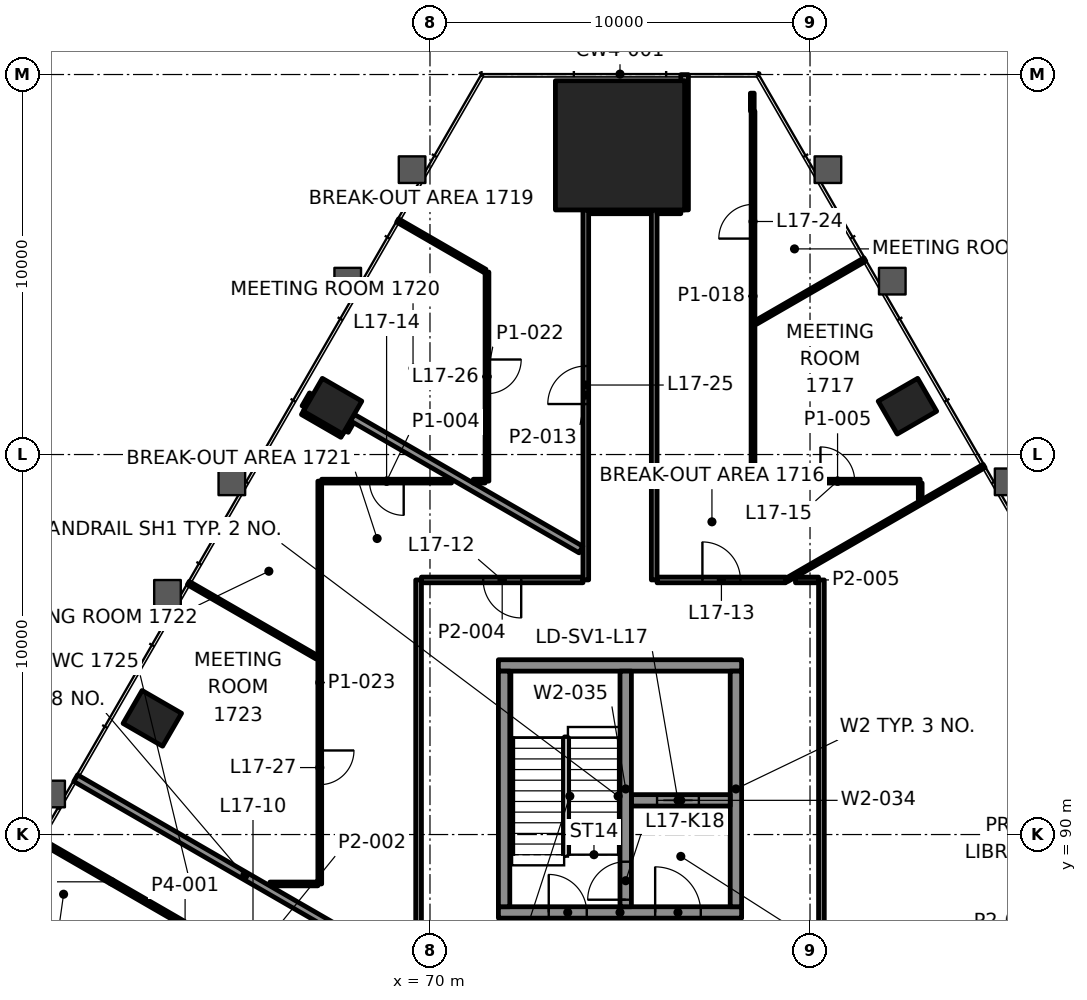
"""IFC4 building model, lengths in metres.
Left out: names, types, materials, properties, quantities, classifications, styles, units other than length and angle.
Written with IfcOpenShell. Run it as: python <this file> out.ifc"""

import sys

from ifc_helpers import new_model, si_unit, direction, frame, frame_2d, origin, origin_2d, place, context, subcontext, project, spatial, rectangle, extrude, element, fill, save


model = new_model("IFC4")
c1 = context("Model", 3, precision=1e-05, world=origin(), true_north=direction((0.0, 1.0)))
c2 = subcontext(c1, "Body", "Model", "MODEL_VIEW")
j1 = project(units=[si_unit("LENGTHUNIT", "METRE"), si_unit("PLANEANGLEUNIT", "RADIAN")], contexts=[c1])
p1 = place(None, origin())
s1 = spatial("IfcSite", under=j1, at=p1, CompositionType="ELEMENT")
p2 = place(p1, origin())
s2 = spatial("IfcBuilding", under=s1, at=p2, CompositionType="ELEMENT")
p3 = place(p2, frame((0.0, 0.0, 77.8)))
s3 = spatial("IfcBuildingStorey", under=s2, at=p3, CompositionType="ELEMENT", Elevation=77.8)
p4 = place(p3, frame((75.0, 108.136, 0.0), z_axis=(0.0, 0.0, 1.0), x_axis=(-1.0, 0.0, 0.0)))
e1 = element("IfcColumn", 1, at=p4, inside=s3, PredefinedType="COLUMN", context=c2, shape_type="SweptSolid", body=[
    extrude(rectangle(XDim=3.4, YDim=3.4, at=origin_2d()), origin(), (0.0, 0.0, 1.0), 4.2),
])
for number, where, z_axis, x_axis in (
    (2, (82.563, 101.272, -0.0), (0.0, 0.0, 1.0), (-0.5, 0.866, 0.0)),
    (3, (67.437, 101.272, -0.0), (0.0, 0.0, 1.0), (-0.5, -0.866, 0.0)),
    (4, (62.694, 93.057, -0.0), (0.0, 0.0, 1.0), (-0.5, -0.866, 0.0)),
):
    element("IfcColumn", number, at=place(p3, frame(where, z_axis=z_axis, x_axis=x_axis)), inside=s3, PredefinedType="COLUMN", context=c2, shape_type="SweptSolid", body=[
        extrude(rectangle(XDim=1.0, YDim=1.2, at=origin_2d()), origin(), (0.0, 0.0, 1.0), 4.2),
    ])
p5 = place(p3, frame((71.8, 87.95, 0.0), z_axis=(0.0, 0.0, 1.0), x_axis=(1.0, 0.0, 0.0)))
e5 = element("IfcWall", 5, at=p5, inside=s3, PredefinedType="SHEAR", context=c2, shape_type="SweptSolid", body=[
    extrude(rectangle(XDim=6.4, YDim=0.3, at=frame_2d((3.2, 0.0))), origin(), (0.0, 0.0, 1.0), 4.0),
])
p6 = place(p5, frame((1.325, 0.0, 0.0)))
e6 = element("IfcOpeningElement", 6, at=p6, cuts=e5, PredefinedType="OPENING", context=c2, shape_type="SweptSolid", body=[
    extrude(rectangle(XDim=1.0, YDim=2.1, at=frame_2d((0.5, 1.05))), frame((0.0, 0.16, 0.0), z_axis=(0.0, -1.0, 0.0), x_axis=(1.0, 0.0, 0.0)), (0.0, 0.0, 1.0), 0.32),
])
p7 = place(p5, frame((4.125, 0.0, 0.0)))
e7 = element("IfcOpeningElement", 7, at=p7, cuts=e5, PredefinedType="OPENING", context=c2, shape_type="SweptSolid", body=[
    extrude(rectangle(XDim=1.2, YDim=2.1, at=frame_2d((0.6, 1.05))), frame((0.0, 0.16, 0.0), z_axis=(0.0, -1.0, 0.0), x_axis=(1.0, 0.0, 0.0)), (0.0, 0.0, 1.0), 0.32),
])
p8 = place(p3, frame((71.8, 94.45, 0.0), z_axis=(0.0, 0.0, 1.0), x_axis=(1.0, 0.0, 0.0)))
e8 = element("IfcWall", 8, at=p8, inside=s3, PredefinedType="SHEAR", context=c2, shape_type="SweptSolid", body=[
    extrude(rectangle(XDim=6.4, YDim=0.3, at=frame_2d((3.2, 0.0))), origin(), (0.0, 0.0, 1.0), 4.0),
])
for number, where, z_axis, x_axis in (
    (9, (71.95, 88.1, 0.0), (0.0, 0.0, 1.0), (0.0, 1.0, 0.0)),
    (10, (78.05, 88.1, 0.0), (0.0, 0.0, 1.0), (0.0, 1.0, 0.0)),
):
    element("IfcWall", number, at=place(p3, frame(where, z_axis=z_axis, x_axis=x_axis)), inside=s3, PredefinedType="SHEAR", context=c2, shape_type="SweptSolid", body=[
        extrude(rectangle(XDim=6.2, YDim=0.3, at=frame_2d((3.1, 0.0))), origin(), (0.0, 0.0, 1.0), 4.0),
    ])
p9 = place(p3, frame((75.3, 90.9, 0.0), z_axis=(0.0, 0.0, 1.0), x_axis=(1.0, 0.0, 0.0)))
e11 = element("IfcWall", 11, at=p9, inside=s3, PredefinedType="SHEAR", context=c2, shape_type="SweptSolid", body=[
    extrude(rectangle(XDim=2.6, YDim=0.3, at=frame_2d((1.3, 0.0))), origin(), (0.0, 0.0, 1.0), 4.0),
])
p10 = place(p9, frame((0.675, 0.0, 0.0)))
e12 = element("IfcOpeningElement", 12, at=p10, cuts=e11, PredefinedType="OPENING", context=c2, shape_type="SweptSolid", body=[
    extrude(rectangle(XDim=1.1, YDim=2.1, at=frame_2d((0.55, 1.05))), frame((0.0, 0.16, 0.0), z_axis=(0.0, -1.0, 0.0), x_axis=(1.0, 0.0, 0.0)), (0.0, 0.0, 1.0), 0.32),
])
p11 = place(p3, frame((75.15, 88.1, 0.0), z_axis=(0.0, 0.0, 1.0), x_axis=(0.0, 1.0, 0.0)))
e13 = element("IfcWall", 13, at=p11, inside=s3, PredefinedType="SHEAR", context=c2, shape_type="SweptSolid", body=[
    extrude(rectangle(XDim=6.2, YDim=0.3, at=frame_2d((3.1, 0.0))), origin(), (0.0, 0.0, 1.0), 4.0),
])
p12 = place(p11, frame((0.185, 0.0, 0.0)))
e14 = element("IfcOpeningElement", 14, at=p12, cuts=e13, PredefinedType="OPENING", context=c2, shape_type="SweptSolid", body=[
    extrude(rectangle(XDim=1.0, YDim=2.1, at=frame_2d((0.5, 1.05))), frame((0.0, 0.16, 0.0), z_axis=(0.0, -1.0, 0.0), x_axis=(1.0, 0.0, 0.0)), (0.0, 0.0, 1.0), 0.32),
])
p13 = place(p3, frame((65.789, 88.7, 0.0), z_axis=(0.0, 0.0, 1.0), x_axis=(1.0, 0.0, 0.0)))
e15 = element("IfcWall", 15, at=p13, inside=s3, PredefinedType="PARTITIONING", context=c2, shape_type="SweptSolid", body=[
    extrude(rectangle(XDim=1.261, YDim=0.1, at=frame_2d((0.631, 0.0))), origin(), (0.0, 0.0, 1.0), 3.4),
])
p14 = place(p3, frame((74.025, 96.7, 0.0), z_axis=(0.0, 0.0, 1.0), x_axis=(-1.0, 0.0, 0.0)))
e16 = element("IfcWall", 16, at=p14, inside=s3, PredefinedType="PARTITIONING", context=c2, shape_type="SweptSolid", body=[
    extrude(rectangle(XDim=4.25, YDim=0.15, at=frame_2d((2.125, 0.0))), origin(), (0.0, 0.0, 1.0), 3.4),
])
p15 = place(p14, frame((1.625, 0.0, 0.0)))
e17 = element("IfcOpeningElement", 17, at=p15, cuts=e16, PredefinedType="OPENING", context=c2, shape_type="SweptSolid", body=[
    extrude(rectangle(XDim=1.0, YDim=2.1, at=frame_2d((0.5, 1.05))), frame((0.0, 0.085, 0.0), z_axis=(0.0, -1.0, 0.0), x_axis=(1.0, 0.0, 0.0)), (0.0, 0.0, 1.0), 0.17),
])
p16 = place(p3, frame((75.975, 96.7, 0.0), z_axis=(0.0, 0.0, 1.0), x_axis=(1.0, 0.0, 0.0)))
e18 = element("IfcWall", 18, at=p16, inside=s3, PredefinedType="PARTITIONING", context=c2, shape_type="SweptSolid", body=[
    extrude(rectangle(XDim=3.387, YDim=0.15, at=frame_2d((1.693, 0.0))), origin(), (0.0, 0.0, 1.0), 3.4),
])
p17 = place(p16, frame((1.194, 0.0, 0.0)))
e19 = element("IfcOpeningElement", 19, at=p17, cuts=e18, PredefinedType="OPENING", context=c2, shape_type="SweptSolid", body=[
    extrude(rectangle(XDim=1.0, YDim=2.1, at=frame_2d((0.5, 1.05))), frame((0.0, 0.085, 0.0), z_axis=(0.0, -1.0, 0.0), x_axis=(1.0, 0.0, 0.0)), (0.0, 0.0, 1.0), 0.17),
])
p18 = place(p3, frame((70.567, 99.3, 0.0), z_axis=(0.0, 0.0, 1.0), x_axis=(-1.0, 0.0, 0.0)))
e20 = element("IfcWall", 20, at=p18, inside=s3, PredefinedType="PARTITIONING", context=c2, shape_type="SweptSolid", body=[
    extrude(rectangle(XDim=3.417, YDim=0.1, at=frame_2d((1.708, 0.0))), origin(), (0.0, 0.0, 1.0), 3.4),
])
p19 = place(p18, frame((1.258, 0.0, 0.0)))
e21 = element("IfcOpeningElement", 21, at=p19, cuts=e20, PredefinedType="OPENING", context=c2, shape_type="SweptSolid", body=[
    extrude(rectangle(XDim=0.9, YDim=2.1, at=frame_2d((0.45, 1.05))), frame((0.0, 0.06, 0.0), z_axis=(0.0, -1.0, 0.0), x_axis=(1.0, 0.0, 0.0)), (0.0, 0.0, 1.0), 0.12),
])
p20 = place(p3, frame((78.55, 99.3, 0.0), z_axis=(0.0, 0.0, 1.0), x_axis=(1.0, 0.0, 0.0)))
e22 = element("IfcWall", 22, at=p20, inside=s3, PredefinedType="PARTITIONING", context=c2, shape_type="SweptSolid", body=[
    extrude(rectangle(XDim=4.349, YDim=0.1, at=frame_2d((2.175, 0.0))), origin(), (0.0, 0.0, 1.0), 3.4),
])
p21 = place(p20, frame((1.725, 0.0, 0.0)))
e23 = element("IfcOpeningElement", 23, at=p21, cuts=e22, PredefinedType="OPENING", context=c2, shape_type="SweptSolid", body=[
    extrude(rectangle(XDim=0.9, YDim=2.1, at=frame_2d((0.45, 1.05))), frame((0.0, 0.06, 0.0), z_axis=(0.0, -1.0, 0.0), x_axis=(1.0, 0.0, 0.0)), (0.0, 0.0, 1.0), 0.12),
])
p22 = place(p3, frame((74.176, 106.437, 0.0), z_axis=(0.0, 0.0, 1.0), x_axis=(1.0, 0.0, 0.0)))
e24 = element("IfcWall", 24, at=p22, inside=s3, PredefinedType="PARTITIONING", context=c2, shape_type="SweptSolid", body=[
    extrude(rectangle(XDim=1.649, YDim=0.2, at=frame_2d((0.825, 0.0))), origin(), (0.0, 0.0, 1.0), 3.397),
])
p23 = place(p3, frame((79.387, 96.7, 0.0), z_axis=(0.0, 0.0, 1.0), x_axis=(0.866032365835, 0.499987941182, 0.0)))
e25 = element("IfcWall", 25, at=p23, inside=s3, PredefinedType="PARTITIONING", context=c2, shape_type="SweptSolid", body=[
    extrude(rectangle(XDim=5.997, YDim=0.1, at=frame_2d((2.999, 0.0))), origin(), (0.0, 0.0, 1.0), 3.165),
])
p24 = place(p3, frame((78.576, 103.476, 0.0), z_axis=(0.0, 0.0, 1.0), x_axis=(0.866043162687, 0.499969239416, 0.0)))
e26 = element("IfcWall", 26, at=p24, inside=s3, PredefinedType="PARTITIONING", context=c2, shape_type="SweptSolid", body=[
    extrude(rectangle(XDim=3.311, YDim=0.1, at=frame_2d((1.656, 0.0))), origin(), (0.0, 0.0, 1.0), 3.4),
])
p25 = place(p3, frame((67.761, 100.634, 0.0), z_axis=(0.0, 0.0, 1.0), x_axis=(0.500305662732, 0.865848857387, 0.0)))
e27 = element("IfcWall", 27, at=p25, inside=s3, PredefinedType="PARTITIONING", context=c2, shape_type="SweptSolid", body=[
    extrude(rectangle(XDim=0.29, YDim=0.2, at=frame_2d((0.145, 0.0))), origin(), (0.0, 0.0, 1.0), 3.4),
])
p26 = place(p3, frame((66.721, 101.232, 0.0), z_axis=(0.0, 0.0, 1.0), x_axis=(0.500080938595, 0.865978668822, 0.0)))
e28 = element("IfcWall", 28, at=p26, inside=s3, PredefinedType="PARTITIONING", context=c2, shape_type="SweptSolid", body=[
    extrude(rectangle(XDim=0.393, YDim=0.2, at=frame_2d((0.197, 0.0))), origin(), (0.0, 0.0, 1.0), 3.4),
])
p27 = place(p3, frame((82.9, 98.816, 0.0), z_axis=(0.0, 0.0, 1.0), x_axis=(0.0, 1.0, 0.0)))
e29 = element("IfcWall", 29, at=p27, inside=s3, PredefinedType="PARTITIONING", context=c2, shape_type="SweptSolid", body=[
    extrude(rectangle(XDim=0.433, YDim=0.1, at=frame_2d((0.217, 0.0))), origin(), (0.0, 0.0, 1.0), 3.4),
])
p28 = place(p3, frame((80.3, 86.1, 0.0), z_axis=(0.0, 0.0, 1.0), x_axis=(0.0, 1.0, 0.0)))
e30 = element("IfcWall", 30, at=p28, inside=s3, PredefinedType="PARTITIONING", context=c2, shape_type="SweptSolid", body=[
    extrude(rectangle(XDim=10.599, YDim=0.15, at=frame_2d((5.3, 0.0))), origin(), (0.0, 0.0, 1.0), 3.4),
])
p29 = place(p3, frame((78.5, 99.3, 0.0), z_axis=(0.0, 0.0, 1.0), x_axis=(0.0, 1.0, 0.0)))
e31 = element("IfcWall", 31, at=p29, inside=s3, PredefinedType="PARTITIONING", context=c2, shape_type="SweptSolid", body=[
    extrude(rectangle(XDim=9.736, YDim=0.1, at=frame_2d((4.868, 0.0))), origin(), (0.0, 0.0, 1.0), 3.4),
])
p30 = place(p29, frame((6.382, 0.0, 0.0)))
e32 = element("IfcOpeningElement", 32, at=p30, cuts=e31, PredefinedType="OPENING", context=c2, shape_type="SweptSolid", body=[
    extrude(rectangle(XDim=0.9, YDim=2.1, at=frame_2d((0.45, 1.05))), frame((0.0, 0.06, 0.0), z_axis=(0.0, -1.0, 0.0), x_axis=(1.0, 0.0, 0.0)), (0.0, 0.0, 1.0), 0.12),
])
p31 = place(p3, frame((78.481, 109.037, 0.0), z_axis=(0.0, 0.0, 1.0), x_axis=(0.0, 1.0, 0.0)))
e33 = element("IfcWall", 33, at=p31, inside=s3, PredefinedType="PARTITIONING", context=c2, shape_type="SweptSolid", body=[
    extrude(rectangle(XDim=0.473, YDim=0.1, at=frame_2d((0.237, 0.0))), origin(), (0.0, 0.0, 1.0), 3.4),
])
p32 = place(p3, frame((76.7, 106.437, 0.0), z_axis=(0.0, 0.0, 1.0), x_axis=(0.0, 1.0, 0.0)))
e34 = element("IfcWall", 34, at=p32, inside=s3, PredefinedType="PARTITIONING", context=c2, shape_type="SweptSolid", body=[
    extrude(rectangle(XDim=3.56, YDim=0.2, at=frame_2d((1.78, 0.0))), origin(), (0.0, 0.0, 1.0), 3.4),
])
p33 = place(p3, frame((75.9, 96.7, 0.0), z_axis=(0.0, 0.0, 1.0), x_axis=(0.0, 1.0, 0.0)))
e35 = element("IfcWall", 35, at=p33, inside=s3, PredefinedType="PARTITIONING", context=c2, shape_type="SweptSolid", body=[
    extrude(rectangle(XDim=9.737, YDim=0.15, at=frame_2d((4.868, 0.0))), origin(), (0.0, 0.0, 1.0), 3.4),
])
p34 = place(p3, frame((74.1, 96.7, 0.0), z_axis=(0.0, 0.0, 1.0), x_axis=(0.0, 1.0, 0.0)))
e36 = element("IfcWall", 36, at=p34, inside=s3, PredefinedType="PARTITIONING", context=c2, shape_type="SweptSolid", body=[
    extrude(rectangle(XDim=9.736, YDim=0.15, at=frame_2d((4.868, 0.0))), origin(), (0.0, 0.0, 1.0), 3.4),
])
p35 = place(p34, frame((4.629, 0.0, 0.0)))
e37 = element("IfcOpeningElement", 37, at=p35, cuts=e36, PredefinedType="OPENING", context=c2, shape_type="SweptSolid", body=[
    extrude(rectangle(XDim=1.0, YDim=2.1, at=frame_2d((0.5, 1.05))), frame((0.0, 0.085, 0.0), z_axis=(0.0, -1.0, 0.0), x_axis=(1.0, 0.0, 0.0)), (0.0, 0.0, 1.0), 0.17),
])
p36 = place(p3, frame((71.5, 104.801, 0.0), z_axis=(0.0, 0.0, 1.0), x_axis=(0.0, -1.0, 0.0)))
e38 = element("IfcWall", 38, at=p36, inside=s3, PredefinedType="PARTITIONING", context=c2, shape_type="SweptSolid", body=[
    extrude(rectangle(XDim=5.501, YDim=0.1, at=frame_2d((2.75, 0.0))), origin(), (0.0, 0.0, 1.0), 3.4),
])
p37 = place(p36, frame((2.301, 0.0, 0.0)))
e39 = element("IfcOpeningElement", 39, at=p37, cuts=e38, PredefinedType="OPENING", context=c2, shape_type="SweptSolid", body=[
    extrude(rectangle(XDim=0.9, YDim=2.1, at=frame_2d((0.45, 1.05))), frame((0.0, 0.06, 0.0), z_axis=(0.0, -1.0, 0.0), x_axis=(1.0, 0.0, 0.0)), (0.0, 0.0, 1.0), 0.12),
])
p38 = place(p3, frame((69.7, 86.1, 0.0), z_axis=(0.0, 0.0, 1.0), x_axis=(0.0, 1.0, 0.0)))
e40 = element("IfcWall", 40, at=p38, inside=s3, PredefinedType="PARTITIONING", context=c2, shape_type="SweptSolid", body=[
    extrude(rectangle(XDim=10.6, YDim=0.15, at=frame_2d((5.3, 0.0))), origin(), (0.0, 0.0, 1.0), 3.4),
])
p39 = place(p3, frame((67.1, 99.3, 0.0), z_axis=(0.0, 0.0, 1.0), x_axis=(0.0, -1.0, 0.0)))
e41 = element("IfcWall", 41, at=p39, inside=s3, PredefinedType="PARTITIONING", context=c2, shape_type="SweptSolid", body=[
    extrude(rectangle(XDim=10.6, YDim=0.1, at=frame_2d((5.3, 0.0))), origin(), (0.0, 0.0, 1.0), 3.4),
])
p40 = place(p39, frame((7.088, 0.0, 0.0)))
e42 = element("IfcOpeningElement", 42, at=p40, cuts=e41, PredefinedType="OPENING", context=c2, shape_type="SweptSolid", body=[
    extrude(rectangle(XDim=0.9, YDim=2.1, at=frame_2d((0.45, 1.05))), frame((0.0, 0.06, 0.0), z_axis=(0.0, -1.0, 0.0), x_axis=(1.0, 0.0, 0.0)), (0.0, 0.0, 1.0), 0.12),
])
p41 = place(p3, frame((71.45, 104.83, 0.0), z_axis=(0.0, 0.0, 1.0), x_axis=(-0.866023371876, 0.500003519352, 0.0)))
e43 = element("IfcWall", 43, at=p41, inside=s3, PredefinedType="PARTITIONING", context=c2, shape_type="SweptSolid", body=[
    extrude(rectangle(XDim=2.657, YDim=0.1, at=frame_2d((1.328, 0.0))), origin(), (0.0, 0.0, 1.0), 3.4),
])
p42 = place(p3, frame((73.973, 97.499, 0.0), z_axis=(0.0, 0.0, 1.0), x_axis=(-0.866037536751, 0.499978984496, 0.0)))
e44 = element("IfcWall", 44, at=p42, inside=s3, PredefinedType="PARTITIONING", context=c2, shape_type="SweptSolid", body=[
    extrude(rectangle(XDim=6.948, YDim=0.2, at=frame_2d((3.474, 0.0))), origin(), (0.0, 0.0, 1.0), 3.4),
])
p43 = place(p3, frame((67.707, 100.539, 0.0), z_axis=(0.0, 0.0, 1.0), x_axis=(-0.865955154139, 0.50012165622, 0.0)))
e45 = element("IfcWall", 45, at=p43, inside=s3, PredefinedType="PARTITIONING", context=c2, shape_type="SweptSolid", body=[
    extrude(rectangle(XDim=1.2, YDim=0.2, at=frame_2d((0.6, 0.0))), origin(), (0.0, 0.0, 1.0), 3.165),
])
p44 = place(p3, frame((67.024, 94.665, 0.0), z_axis=(0.0, 0.0, 1.0), x_axis=(-0.866046116492, 0.499964122822, 0.0)))
e46 = element("IfcWall", 46, at=p44, inside=s3, PredefinedType="PARTITIONING", context=c2, shape_type="SweptSolid", body=[
    extrude(rectangle(XDim=3.906, YDim=0.1, at=frame_2d((1.953, 0.0))), origin(), (0.0, 0.0, 1.0), 3.165),
])
p45 = place(p3, frame((69.573, 86.348, 0.0), z_axis=(0.0, 0.0, 1.0), x_axis=(-0.866024495625, 0.500001572974, 0.0)))
e47 = element("IfcWall", 47, at=p45, inside=s3, PredefinedType="PARTITIONING", context=c2, shape_type="SweptSolid", body=[
    extrude(rectangle(XDim=10.272, YDim=0.2, at=frame_2d((5.136, 0.0))), origin(), (0.0, 0.0, 1.0), 3.165),
])
p46 = place(p3, frame((63.512, 87.665, 0.0), z_axis=(0.0, 0.0, 1.0), x_axis=(-0.866014185868, 0.500019429497, 0.0)))
e48 = element("IfcWall", 48, at=p46, inside=s3, PredefinedType="PARTITIONING", context=c2, shape_type="SweptSolid", body=[
    extrude(rectangle(XDim=4.365, YDim=0.12, at=frame_2d((2.182, 0.0))), origin(), (0.0, 0.0, 1.0), 3.165),
])
p47 = place(p3, frame((79.617, 96.7, 0.0), z_axis=(0.0, 0.0, 1.0), x_axis=(1.0, 0.0, 0.0)))
e49 = element("IfcWall", 49, at=p47, inside=s3, PredefinedType="PARTITIONING", context=c2, shape_type="SweptSolid", body=[
    extrude(rectangle(XDim=0.607, YDim=0.15, at=frame_2d((0.304, 0.0))), origin(), (0.0, 0.0, 1.0), 3.4),
])
p48 = place(p3, frame((71.14, 99.3, 0.0), z_axis=(0.0, 0.0, 1.0), x_axis=(1.0, 0.0, 0.0)))
e50 = element("IfcWall", 50, at=p48, inside=s3, PredefinedType="PARTITIONING", context=c2, shape_type="SweptSolid", body=[
    extrude(rectangle(XDim=0.31, YDim=0.1, at=frame_2d((0.155, 0.0))), origin(), (0.0, 0.0, 1.0), 3.4),
])
p49 = place(p3, frame((75.975, 106.437, 0.0), z_axis=(0.0, 0.0, 1.0), x_axis=(1.0, 0.0, 0.0)))
e51 = element("IfcWall", 51, at=p49, inside=s3, PredefinedType="PARTITIONING", context=c2, shape_type="SweptSolid", body=[
    extrude(rectangle(XDim=0.625, YDim=0.2, at=frame_2d((0.312, 0.0))), origin(), (0.0, 0.0, 1.0), 3.4),
])
p50 = place(p15, origin())
e52 = element("IfcDoor", 52, at=p50, inside=s3, OperationType="SINGLE_SWING_LEFT", PredefinedType="DOOR", context=c2, shape_type="SweptSolid", body=[
    extrude(rectangle(XDim=1.0, YDim=2.1, at=frame_2d((0.5, 1.05))), frame((0.0, 0.025, 0.0), z_axis=(0.0, -1.0, 0.0), x_axis=(1.0, 0.0, 0.0)), (0.0, 0.0, 1.0), 0.05),
])
fill(e17, e52)
p51 = place(p17, origin())
e53 = element("IfcDoor", 53, at=p51, inside=s3, OperationType="SINGLE_SWING_LEFT", PredefinedType="DOOR", context=c2, shape_type="SweptSolid", body=[
    extrude(rectangle(XDim=1.0, YDim=2.1, at=frame_2d((0.5, 1.05))), frame((0.0, 0.025, 0.0), z_axis=(0.0, -1.0, 0.0), x_axis=(1.0, 0.0, 0.0)), (0.0, 0.0, 1.0), 0.05),
])
fill(e19, e53)
p52 = place(p19, origin())
e54 = element("IfcDoor", 54, at=p52, inside=s3, OperationType="SINGLE_SWING_RIGHT", PredefinedType="DOOR", context=c2, shape_type="SweptSolid", body=[
    extrude(rectangle(XDim=0.9, YDim=2.1, at=frame_2d((0.45, 1.05))), frame((0.0, 0.025, 0.0), z_axis=(0.0, -1.0, 0.0), x_axis=(1.0, 0.0, 0.0)), (0.0, 0.0, 1.0), 0.05),
])
fill(e21, e54)
p53 = place(p21, origin())
e55 = element("IfcDoor", 55, at=p53, inside=s3, OperationType="SINGLE_SWING_RIGHT", PredefinedType="DOOR", context=c2, shape_type="SweptSolid", body=[
    extrude(rectangle(XDim=0.9, YDim=2.1, at=frame_2d((0.45, 1.05))), frame((0.0, 0.025, 0.0), z_axis=(0.0, -1.0, 0.0), x_axis=(1.0, 0.0, 0.0)), (0.0, 0.0, 1.0), 0.05),
])
fill(e23, e55)
p54 = place(p30, origin())
e56 = element("IfcDoor", 56, at=p54, inside=s3, OperationType="SINGLE_SWING_LEFT", PredefinedType="DOOR", context=c2, shape_type="SweptSolid", body=[
    extrude(rectangle(XDim=0.9, YDim=2.1, at=frame_2d((0.45, 1.05))), frame((0.0, 0.025, 0.0), z_axis=(0.0, -1.0, 0.0), x_axis=(1.0, 0.0, 0.0)), (0.0, 0.0, 1.0), 0.05),
])
fill(e32, e56)
p55 = place(p35, origin())
e57 = element("IfcDoor", 57, at=p55, inside=s3, OperationType="SINGLE_SWING_RIGHT", PredefinedType="DOOR", context=c2, shape_type="SweptSolid", body=[
    extrude(rectangle(XDim=1.0, YDim=2.1, at=frame_2d((0.5, 1.05))), frame((0.0, 0.025, 0.0), z_axis=(0.0, -1.0, 0.0), x_axis=(1.0, 0.0, 0.0)), (0.0, 0.0, 1.0), 0.05),
])
fill(e37, e57)
p56 = place(p37, origin())
e58 = element("IfcDoor", 58, at=p56, inside=s3, OperationType="SINGLE_SWING_RIGHT", PredefinedType="DOOR", context=c2, shape_type="SweptSolid", body=[
    extrude(rectangle(XDim=0.9, YDim=2.1, at=frame_2d((0.45, 1.05))), frame((0.0, 0.025, 0.0), z_axis=(0.0, -1.0, 0.0), x_axis=(1.0, 0.0, 0.0)), (0.0, 0.0, 1.0), 0.05),
])
fill(e39, e58)
p57 = place(p40, origin())
e59 = element("IfcDoor", 59, at=p57, inside=s3, OperationType="SINGLE_SWING_LEFT", PredefinedType="DOOR", context=c2, shape_type="SweptSolid", body=[
    extrude(rectangle(XDim=0.9, YDim=2.1, at=frame_2d((0.45, 1.05))), frame((0.0, 0.025, 0.0), z_axis=(0.0, -1.0, 0.0), x_axis=(1.0, 0.0, 0.0)), (0.0, 0.0, 1.0), 0.05),
])
fill(e42, e59)
p58 = place(p10, origin())
e60 = element("IfcDoor", 60, at=p58, inside=s3, OperationType="DOUBLE_DOOR_SLIDING", PredefinedType="DOOR", context=c2, shape_type="SweptSolid", body=[
    extrude(rectangle(XDim=1.1, YDim=2.1, at=frame_2d((0.55, 1.05))), frame((0.0, 0.025, 0.0), z_axis=(0.0, -1.0, 0.0), x_axis=(1.0, 0.0, 0.0)), (0.0, 0.0, 1.0), 0.05),
])
fill(e12, e60)
p59 = place(p6, origin())
e61 = element("IfcDoor", 61, at=p59, inside=s3, OperationType="SINGLE_SWING_RIGHT", PredefinedType="DOOR", context=c2, shape_type="SweptSolid", body=[
    extrude(rectangle(XDim=1.0, YDim=2.1, at=frame_2d((0.5, 1.05))), frame((0.0, 0.025, 0.0), z_axis=(0.0, -1.0, 0.0), x_axis=(1.0, 0.0, 0.0)), (0.0, 0.0, 1.0), 0.05),
])
fill(e6, e61)
p60 = place(p12, origin())
e62 = element("IfcDoor", 62, at=p60, inside=s3, OperationType="SINGLE_SWING_LEFT", PredefinedType="DOOR", context=c2, shape_type="SweptSolid", body=[
    extrude(rectangle(XDim=1.0, YDim=2.1, at=frame_2d((0.5, 1.05))), frame((0.0, 0.025, 0.0), z_axis=(0.0, -1.0, 0.0), x_axis=(1.0, 0.0, 0.0)), (0.0, 0.0, 1.0), 0.05),
])
fill(e14, e62)
p61 = place(p7, origin())
e63 = element("IfcDoor", 63, at=p61, inside=s3, OperationType="SINGLE_SWING_RIGHT", PredefinedType="DOOR", context=c2, shape_type="SweptSolid", body=[
    extrude(rectangle(XDim=1.2, YDim=2.1, at=frame_2d((0.6, 1.05))), frame((0.0, 0.025, 0.0), z_axis=(0.0, -1.0, 0.0), x_axis=(1.0, 0.0, 0.0)), (0.0, 0.0, 1.0), 0.05),
])
fill(e7, e63)
save(model, sys.argv[1])
